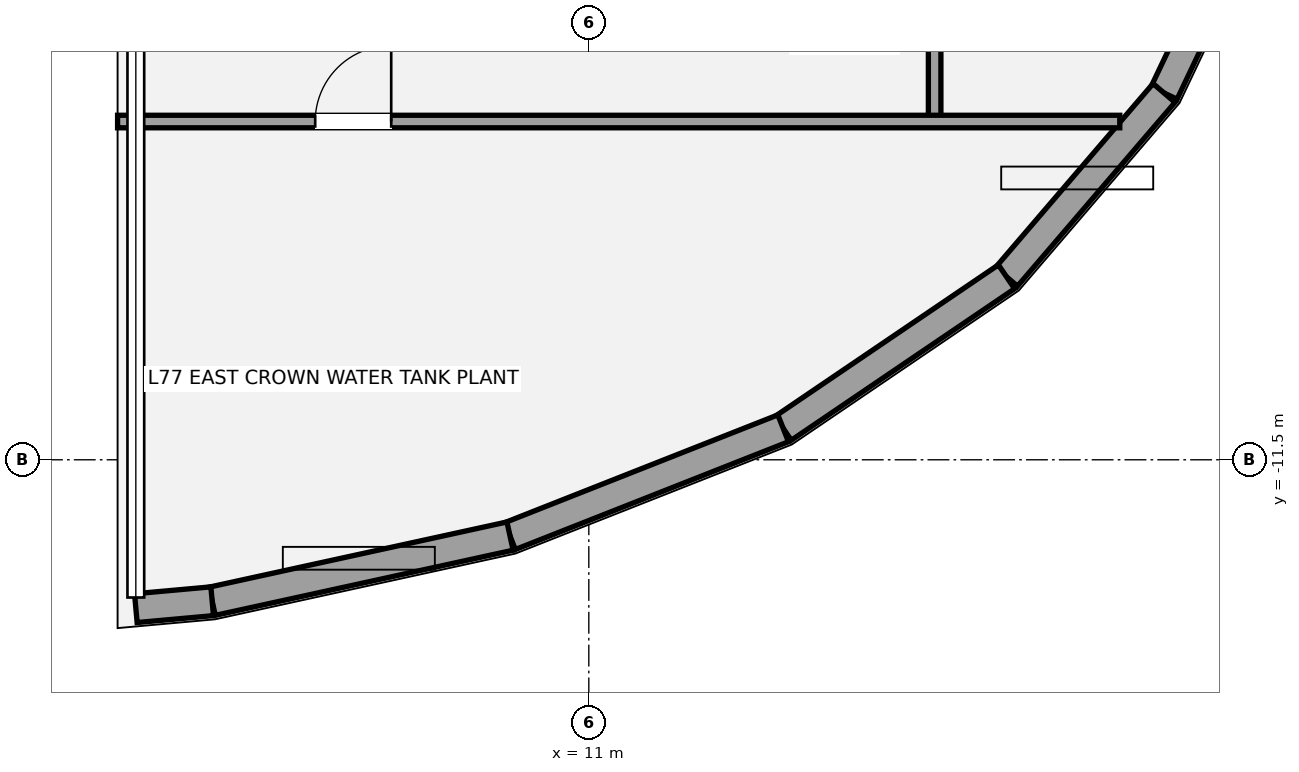
"""IFC4 building model, lengths in metres.
Left out: names, types, materials, properties, quantities, classifications, styles, units other than length and angle.
Written with IfcOpenShell. Run it as: python <this file> out.ifc"""

import sys

from ifc_helpers import new_model, si_unit, direction, frame, frame_2d, origin, place, context, subcontext, project, spatial, rectangle, extrude, element, fill, save


model = new_model("IFC4")
c1 = context("Model", 3, precision=1e-05, world=origin(), true_north=direction((0.0, 1.0)))
c2 = subcontext(c1, "Body", "Model", "MODEL_VIEW")
j1 = project(units=[si_unit("LENGTHUNIT", "METRE"), si_unit("PLANEANGLEUNIT", "RADIAN")], contexts=[c1])
p1 = place(None, origin())
s1 = spatial("IfcSite", under=j1, at=p1, CompositionType="ELEMENT")
p2 = place(p1, origin())
s2 = spatial("IfcBuilding", under=s1, at=p2, CompositionType="ELEMENT")
p3 = place(p2, frame((0.0, 0.0, 273.0)))
s3 = spatial("IfcBuildingStorey", under=s2, at=p3, CompositionType="ELEMENT", Elevation=273.0)
p4 = place(p3, frame((18.569, -6.675, 0.0), z_axis=(0.0, 0.0, 1.0), x_axis=(0.429421676457, 0.903104104624, 0.0)))
e1 = element("IfcWall", 1, at=p4, inside=s3, PredefinedType="ELEMENTEDWALL", context=c2, shape_type="SweptSolid", body=[
    extrude(rectangle(XDim=2.907, YDim=0.38, at=frame_2d((1.454, 0.0))), origin(), (0.0, 0.0, 1.0), 2.97),
])
p5 = place(p3, frame((16.496, -9.093, 0.0), z_axis=(0.0, 0.0, 1.0), x_axis=(0.650835558852, 0.759218726938, 0.0)))
e2 = element("IfcWall", 2, at=p5, inside=s3, PredefinedType="ELEMENTEDWALL", context=c2, shape_type="SweptSolid", body=[
    extrude(rectangle(XDim=3.185, YDim=0.38, at=frame_2d((1.593, 0.0))), origin(), (0.0, 0.0, 1.0), 2.97),
])
p6 = place(p3, frame((13.557, -11.086, 0.0), z_axis=(0.0, 0.0, 1.0), x_axis=(0.827548787006, 0.561393805741, 0.0)))
e3 = element("IfcWall", 3, at=p6, inside=s3, PredefinedType="ELEMENTEDWALL", context=c2, shape_type="SweptSolid", body=[
    extrude(rectangle(XDim=3.551, YDim=0.38, at=frame_2d((1.775, 0.0))), origin(), (0.0, 0.0, 1.0), 2.97),
])
p7 = place(p3, frame((9.963, -12.504, 0.0), z_axis=(0.0, 0.0, 1.0), x_axis=(0.930231308044, 0.366973723221, 0.0)))
e4 = element("IfcWall", 4, at=p7, inside=s3, PredefinedType="ELEMENTEDWALL", context=c2, shape_type="SweptSolid", body=[
    extrude(rectangle(XDim=3.863, YDim=0.38, at=frame_2d((1.932, 0.0))), origin(), (0.0, 0.0, 1.0), 2.97),
])
p8 = place(p3, frame((6.044, -13.361, 0.0), z_axis=(0.0, 0.0, 1.0), x_axis=(0.97689207626, 0.213733177911, 0.0)))
e5 = element("IfcWall", 5, at=p8, inside=s3, PredefinedType="ELEMENTEDWALL", context=c2, shape_type="SweptSolid", body=[
    extrude(rectangle(XDim=4.012, YDim=0.38, at=frame_2d((2.006, 0.0))), origin(), (0.0, 0.0, 1.0), 2.97),
])
p9 = place(p3, frame((5.04, -13.452, 0.0), z_axis=(0.0, 0.0, 1.0), x_axis=(0.995958429341, 0.089815405271, 0.0)))
e6 = element("IfcWall", 6, at=p9, inside=s3, PredefinedType="ELEMENTEDWALL", context=c2, shape_type="SweptSolid", body=[
    extrude(rectangle(XDim=1.009, YDim=0.38, at=frame_2d((0.504, 0.0))), origin(), (0.0, 0.0, 1.0), 2.97),
])
p10 = place(p3, frame((15.55, -7.05, 0.0), z_axis=(0.0, 0.0, 1.0), x_axis=(0.0, 1.0, 0.0)))
e7 = element("IfcWall", 7, at=p10, inside=s3, PredefinedType="PARTITIONING", context=c2, shape_type="SweptSolid", body=[
    extrude(rectangle(XDim=14.7, YDim=0.165, at=frame_2d((7.35, 0.0))), origin(), (0.0, 0.0, 1.0), 2.987),
])
p11 = place(p10, frame((3.04, 0.0, 0.0)))
e8 = element("IfcOpeningElement", 8, at=p11, cuts=e7, PredefinedType="OPENING", context=c2, shape_type="SweptSolid", body=[
    extrude(rectangle(XDim=1.0, YDim=2.15, at=frame_2d((0.5, 1.075))), frame((0.0, 0.093, 0.0), z_axis=(0.0, -1.0, 0.0), x_axis=(1.0, 0.0, 0.0)), (0.0, 0.0, 1.0), 0.185),
])
p12 = place(p10, frame((10.2, 0.0, 0.0)))
e9 = element("IfcOpeningElement", 9, at=p12, cuts=e7, PredefinedType="OPENING", context=c2, shape_type="SweptSolid", body=[
    extrude(rectangle(XDim=1.0, YDim=2.15, at=frame_2d((0.5, 1.075))), frame((0.0, 0.093, 0.0), z_axis=(0.0, -1.0, 0.0), x_axis=(1.0, 0.0, 0.0)), (0.0, 0.0, 1.0), 0.185),
])
p13 = place(p3, frame((4.8, -7.05, 0.0), z_axis=(0.0, 0.0, 1.0), x_axis=(1.0, 0.0, 0.0)))
e10 = element("IfcWall", 10, at=p13, inside=s3, PredefinedType="PARTITIONING", context=c2, shape_type="SweptSolid", body=[
    extrude(rectangle(XDim=13.186, YDim=0.165, at=frame_2d((6.593, 0.0))), origin(), (0.0, 0.0, 1.0), 2.968),
])
p14 = place(p13, frame((2.6, 0.0, 0.0)))
e11 = element("IfcOpeningElement", 11, at=p14, cuts=e10, PredefinedType="OPENING", context=c2, shape_type="SweptSolid", body=[
    extrude(rectangle(XDim=1.0, YDim=2.15, at=frame_2d((0.5, 1.075))), frame((0.0, 0.093, 0.0), z_axis=(0.0, -1.0, 0.0), x_axis=(1.0, 0.0, 0.0)), (0.0, 0.0, 1.0), 0.185),
])
p15 = place(p14, origin())
e12 = element("IfcDoor", 12, at=p15, inside=s3, OperationType="SINGLE_SWING_RIGHT", PredefinedType="DOOR", context=c2, shape_type="SweptSolid", body=[
    extrude(rectangle(XDim=1.0, YDim=2.15, at=frame_2d((0.5, 1.075))), frame((0.0, 0.025, 0.0), z_axis=(0.0, -1.0, 0.0), x_axis=(1.0, 0.0, 0.0)), (0.0, 0.0, 1.0), 0.05),
])
fill(e11, e12)
save(model, sys.argv[1])
